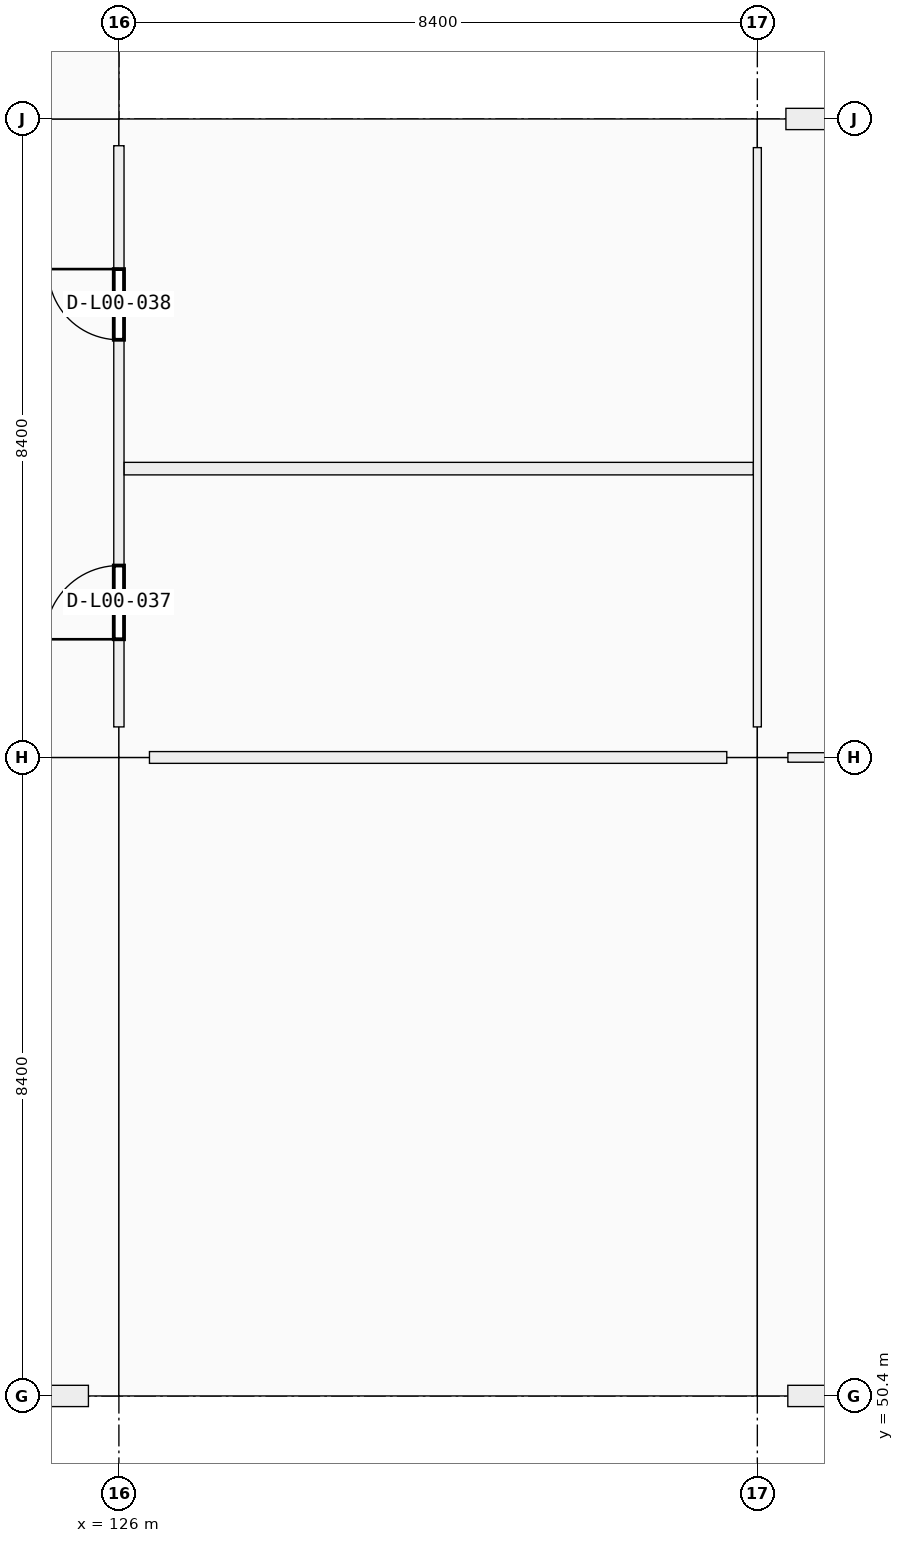
"""IFC4 building model, lengths in metres.
Left out: names, types, materials, properties, quantities, classifications, styles, units other than length and angle.
Written with IfcOpenShell. Run it as: python <this file> out.ifc"""

import sys

from ifc_helpers import new_model, si_unit, direction, frame, frame_2d, origin, origin_2d, place, context, subcontext, project, spatial, rectangle, extrude, element, fill, save


model = new_model("IFC4")
c1 = context("Model", 3, precision=1e-05, world=origin(), true_north=direction((0.0, 1.0)))
c2 = subcontext(c1, "Body", "Model", "MODEL_VIEW")
j1 = project(units=[si_unit("LENGTHUNIT", "METRE"), si_unit("PLANEANGLEUNIT", "RADIAN")], contexts=[c1])
p1 = place(None, origin())
s1 = spatial("IfcSite", under=j1, at=p1, CompositionType="ELEMENT")
p2 = place(p1, origin())
s2 = spatial("IfcBuilding", under=s1, at=p2, CompositionType="ELEMENT")
p3 = place(p2, origin())
s3 = spatial("IfcBuildingStorey", under=s2, at=p3, CompositionType="ELEMENT", Elevation=0.0)
for number, where, z_axis, x_axis in (
    (1, (126.0, 50.4, 0.0), (0.0, 0.0, 1.0), (1.0, 0.0, 0.0)),
    (2, (126.0, 58.8, 0.0), (0.0, 0.0, 1.0), (1.0, 0.0, 0.0)),
):
    element("IfcColumn", number, at=place(p3, frame(where, z_axis=z_axis, x_axis=x_axis)), inside=s3, PredefinedType="COLUMN", context=c2, shape_type="SweptSolid", body=[
        extrude(rectangle(XDim=0.8, YDim=0.8, at=origin_2d()), origin(), (0.0, 0.0, 1.0), 5.76),
    ])
p4 = place(p3, frame((126.0, 67.2, 0.0), z_axis=(0.0, 0.0, 1.0), x_axis=(1.0, 0.0, 0.0)))
e3 = element("IfcColumn", 3, at=p4, inside=s3, PredefinedType="COLUMN", context=c2, shape_type="SweptSolid", body=[
    extrude(rectangle(XDim=0.7, YDim=0.7, at=origin_2d()), origin(), (0.0, 0.0, 1.0), 5.76),
])
for number, where, z_axis, x_axis in (
    (4, (134.4, 50.4, 0.0), (0.0, 0.0, 1.0), (1.0, 0.0, 0.0)),
    (5, (134.4, 58.8, 0.0), (0.0, 0.0, 1.0), (1.0, 0.0, 0.0)),
):
    element("IfcColumn", number, at=place(p3, frame(where, z_axis=z_axis, x_axis=x_axis)), inside=s3, PredefinedType="COLUMN", context=c2, shape_type="SweptSolid", body=[
        extrude(rectangle(XDim=0.8, YDim=0.8, at=origin_2d()), origin(), (0.0, 0.0, 1.0), 5.76),
    ])
p5 = place(p3, frame((134.4, 67.2, 0.0), z_axis=(0.0, 0.0, 1.0), x_axis=(1.0, 0.0, 0.0)))
e6 = element("IfcColumn", 6, at=p5, inside=s3, PredefinedType="COLUMN", context=c2, shape_type="SweptSolid", body=[
    extrude(rectangle(XDim=0.75, YDim=0.75, at=origin_2d()), origin(), (0.0, 0.0, 1.0), 5.76),
])
p6 = place(p3, frame((125.599, 50.4, 0.0), z_axis=(0.0, 0.0, 1.0), x_axis=(-1.0, 0.0, 0.0)))
e7 = element("IfcWall", 7, at=p6, inside=s3, PredefinedType="SOLIDWALL", context=c2, shape_type="SweptSolid", body=[
    extrude(rectangle(XDim=7.598, YDim=0.28, at=frame_2d((3.799, 0.0))), origin(), (0.0, 0.0, 1.0), 4.7),
])
p7 = place(p6, frame((2.924, 0.0, 0.9)))
e8 = element("IfcOpeningElement", 8, at=p7, cuts=e7, PredefinedType="OPENING", context=c2, shape_type="SweptSolid", body=[
    extrude(rectangle(XDim=1.75, YDim=1.95, at=frame_2d((0.875, 0.975))), frame((0.0, 0.14, 0.0), z_axis=(0.0, -1.0, 0.0), x_axis=(1.0, 0.0, 0.0)), (0.0, 0.0, 1.0), 0.28),
])
p8 = place(p3, frame((142.399, 50.4, 0.0), z_axis=(0.0, 0.0, 1.0), x_axis=(-1.0, 0.0, 0.0)))
e9 = element("IfcWall", 9, at=p8, inside=s3, PredefinedType="SOLIDWALL", context=c2, shape_type="SweptSolid", body=[
    extrude(rectangle(XDim=7.598, YDim=0.28, at=frame_2d((3.799, 0.0))), origin(), (0.0, 0.0, 1.0), 4.7),
])
p9 = place(p3, frame((134.776, 67.2, 0.0), z_axis=(0.0, 0.0, 1.0), x_axis=(1.0, 0.0, 0.0)))
e10 = element("IfcWall", 10, at=p9, inside=s3, PredefinedType="SOLIDWALL", context=c2, shape_type="SweptSolid", body=[
    extrude(rectangle(XDim=7.623, YDim=0.28, at=frame_2d((3.812, 0.0))), origin(), (0.0, 0.0, 1.0), 4.7),
])
p10 = place(p9, frame((2.537, 0.0, 0.9)))
e11 = element("IfcOpeningElement", 11, at=p10, cuts=e10, PredefinedType="OPENING", context=c2, shape_type="SweptSolid", body=[
    extrude(rectangle(XDim=2.55, YDim=1.95, at=frame_2d((1.275, 0.975))), frame((0.0, 0.14, 0.0), z_axis=(0.0, -1.0, 0.0), x_axis=(1.0, 0.0, 0.0)), (0.0, 0.0, 1.0), 0.28),
])
p11 = place(p3, frame((126.402, 58.8, 0.0), z_axis=(0.0, 0.0, 1.0), x_axis=(1.0, 0.0, 0.0)))
e12 = element("IfcWall", 12, at=p11, inside=s3, PredefinedType="PARTITIONING", context=c2, shape_type="SweptSolid", body=[
    extrude(rectangle(XDim=7.596, YDim=0.155, at=frame_2d((3.798, 0.0))), origin(), (0.0, 0.0, 1.0), 3.66),
])
p12 = place(p3, frame((134.802, 58.8, 0.0), z_axis=(0.0, 0.0, 1.0), x_axis=(1.0, 0.0, 0.0)))
e13 = element("IfcWall", 13, at=p12, inside=s3, PredefinedType="PARTITIONING", context=c2, shape_type="SweptSolid", body=[
    extrude(rectangle(XDim=7.596, YDim=0.125, at=frame_2d((3.798, 0.0))), origin(), (0.0, 0.0, 1.0), 3.66),
])
p13 = place(p12, frame((3.293, 0.0, 0.0)))
e14 = element("IfcOpeningElement", 14, at=p13, cuts=e13, PredefinedType="OPENING", context=c2, shape_type="SweptSolid", body=[
    extrude(rectangle(XDim=1.01, YDim=2.12, at=frame_2d((0.505, 1.06))), frame((0.0, 0.062, 0.0), z_axis=(0.0, -1.0, 0.0), x_axis=(1.0, 0.0, 0.0)), (0.0, 0.0, 1.0), 0.125),
])
p14 = place(p3, frame((126.0, 59.202, 0.0), z_axis=(0.0, 0.0, 1.0), x_axis=(0.0, 1.0, 0.0)))
e15 = element("IfcWall", 15, at=p14, inside=s3, PredefinedType="PARTITIONING", context=c2, shape_type="SweptSolid", body=[
    extrude(rectangle(XDim=7.646, YDim=0.135, at=frame_2d((3.823, 0.0))), origin(), (0.0, 0.0, 1.0), 3.66),
])
p15 = place(p14, frame((1.153, 0.0, 0.0)))
e16 = element("IfcOpeningElement", 16, at=p15, cuts=e15, PredefinedType="OPENING", context=c2, shape_type="SweptSolid", body=[
    extrude(rectangle(XDim=0.97, YDim=2.12, at=frame_2d((0.485, 1.06))), frame((0.0, 0.067, 0.0), z_axis=(0.0, -1.0, 0.0), x_axis=(1.0, 0.0, 0.0)), (0.0, 0.0, 1.0), 0.135),
])
p16 = place(p14, frame((5.093, 0.0, 0.0)))
e17 = element("IfcOpeningElement", 17, at=p16, cuts=e15, PredefinedType="OPENING", context=c2, shape_type="SweptSolid", body=[
    extrude(rectangle(XDim=0.93, YDim=2.12, at=frame_2d((0.465, 1.06))), frame((0.0, 0.067, 0.0), z_axis=(0.0, -1.0, 0.0), x_axis=(1.0, 0.0, 0.0)), (0.0, 0.0, 1.0), 0.135),
])
p17 = place(p3, frame((134.4, 59.202, 0.0), z_axis=(0.0, 0.0, 1.0), x_axis=(0.0, 1.0, 0.0)))
e18 = element("IfcWall", 18, at=p17, inside=s3, PredefinedType="PARTITIONING", context=c2, shape_type="SweptSolid", body=[
    extrude(rectangle(XDim=7.621, YDim=0.105, at=frame_2d((3.811, 0.0))), origin(), (0.0, 0.0, 1.0), 3.66),
])
p18 = place(p3, frame((126.07, 62.6, 0.0), z_axis=(0.0, 0.0, 1.0), x_axis=(1.0, 0.0, 0.0)))
e19 = element("IfcWall", 19, at=p18, inside=s3, PredefinedType="PARTITIONING", context=c2, shape_type="SweptSolid", body=[
    extrude(rectangle(XDim=8.276, YDim=0.165, at=frame_2d((4.138, 0.0))), origin(), (0.0, 0.0, 1.0), 3.66),
])
p19 = place(p15, origin())
e20 = element("IfcDoor", 20, at=p19, inside=s3, OperationType="SINGLE_SWING_LEFT", PredefinedType="DOOR", context=c2, shape_type="SweptSolid", body=[
    extrude(rectangle(XDim=0.97, YDim=2.12, at=frame_2d((0.485, 1.06))), frame((0.0, 0.025, 0.0), z_axis=(0.0, -1.0, 0.0), x_axis=(1.0, 0.0, 0.0)), (0.0, 0.0, 1.0), 0.05),
])
fill(e16, e20)
p20 = place(p16, origin())
e21 = element("IfcDoor", 21, at=p20, inside=s3, OperationType="SINGLE_SWING_RIGHT", PredefinedType="DOOR", context=c2, shape_type="SweptSolid", body=[
    extrude(rectangle(XDim=0.93, YDim=2.12, at=frame_2d((0.465, 1.06))), frame((0.0, 0.025, 0.0), z_axis=(0.0, -1.0, 0.0), x_axis=(1.0, 0.0, 0.0)), (0.0, 0.0, 1.0), 0.05),
])
fill(e17, e21)
save(model, sys.argv[1])
